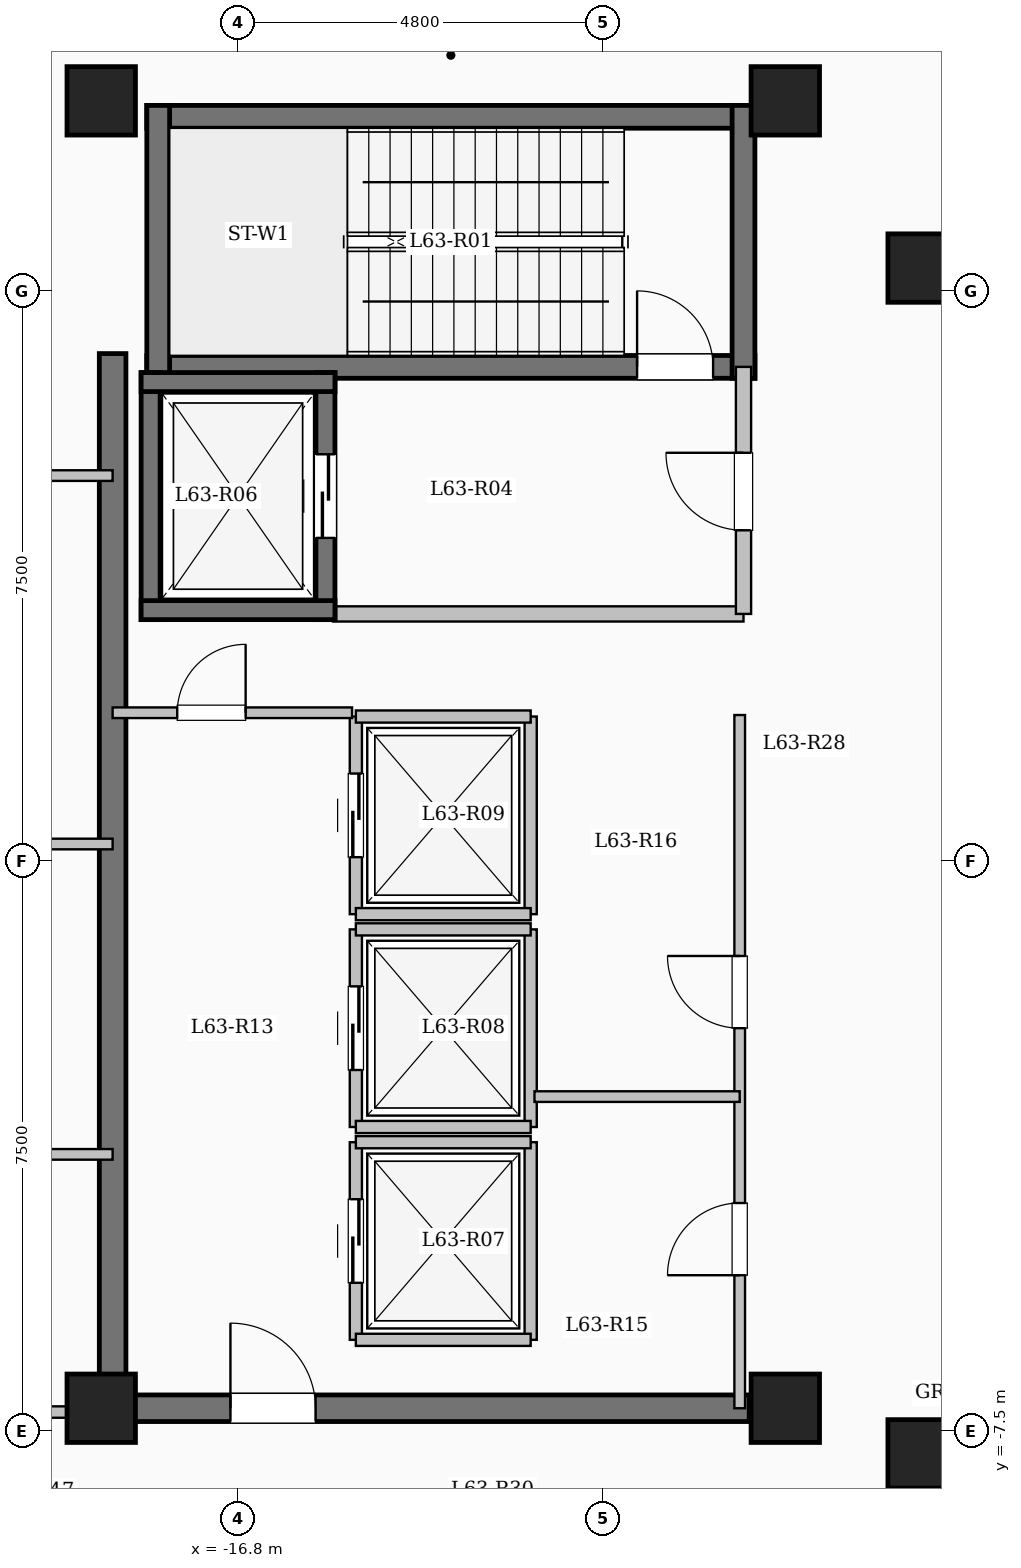
"""IFC4 building model, lengths in metres.
Left out: names, types, materials, properties, quantities, classifications, styles, units other than length and angle.
Written with IfcOpenShell. Run it as: python <this file> out.ifc"""

import sys

from ifc_helpers import new_model, si_unit, direction, frame, frame_2d, origin, origin_2d, place, context, subcontext, project, spatial, rectangle, extrude, element, fill, save


model = new_model("IFC4")
c1 = context("Model", 3, precision=1e-05, world=origin(), true_north=direction((0.0, 1.0)))
c2 = subcontext(c1, "Body", "Model", "MODEL_VIEW")
j1 = project(units=[si_unit("LENGTHUNIT", "METRE"), si_unit("PLANEANGLEUNIT", "RADIAN")], contexts=[c1])
p1 = place(None, origin())
s1 = spatial("IfcSite", under=j1, at=p1, CompositionType="ELEMENT")
p2 = place(p1, origin())
s2 = spatial("IfcBuilding", under=s1, at=p2, CompositionType="ELEMENT")
p3 = place(p2, frame((0.0, 0.0, 231.75)))
s3 = spatial("IfcBuildingStorey", under=s2, at=p3, CompositionType="ELEMENT", Elevation=231.75)
for number, where, z_axis, x_axis in (
    (1, (-7.8, -7.8, 0.0), (0.0, 0.0, 1.0), (1.0, 0.0, 0.0)),
    (2, (-7.8, 7.8, 0.0), (0.0, 0.0, 1.0), (1.0, 0.0, 0.0)),
    (3, (-9.6, -7.2, 0.0), (0.0, 0.0, 1.0), (1.0, 0.0, 0.0)),
    (4, (-9.6, 10.0, 0.0), (0.0, 0.0, 1.0), (1.0, 0.0, 0.0)),
    (5, (-18.6, -7.2, 0.0), (0.0, 0.0, 1.0), (1.0, 0.0, 0.0)),
    (6, (-18.6, 10.0, 0.0), (0.0, 0.0, 1.0), (1.0, 0.0, 0.0)),
):
    element("IfcColumn", number, at=place(p3, frame(where, z_axis=z_axis, x_axis=x_axis)), inside=s3, PredefinedType="COLUMN", context=c2, shape_type="SweptSolid", body=[
        extrude(rectangle(XDim=0.9, YDim=0.9, at=origin_2d()), origin(), (0.0, 0.0, 1.0), 4.65),
    ])
p4 = place(p3, frame((-18.0, 9.79, 0.0), z_axis=(0.0, 0.0, 1.0), x_axis=(1.0, 0.0, 0.0)))
e7 = element("IfcWall", 7, at=p4, inside=s3, PredefinedType="SHEAR", context=c2, shape_type="SweptSolid", body=[
    extrude(rectangle(XDim=8.0, YDim=0.3, at=frame_2d((4.0, 0.0))), origin(), (0.0, 0.0, 1.0), 4.65),
])
p5 = place(p3, frame((-18.0, 6.5, 0.0), z_axis=(0.0, 0.0, 1.0), x_axis=(1.0, 0.0, 0.0)))
e8 = element("IfcWall", 8, at=p5, inside=s3, PredefinedType="SHEAR", context=c2, shape_type="SweptSolid", body=[
    extrude(rectangle(XDim=8.0, YDim=0.3, at=frame_2d((4.0, 0.0))), origin(), (0.0, 0.0, 1.0), 4.65),
])
p6 = place(p5, frame((6.45, 0.0, 0.0)))
e9 = element("IfcOpeningElement", 9, at=p6, cuts=e8, PredefinedType="OPENING", context=c2, shape_type="SweptSolid", body=[
    extrude(rectangle(XDim=1.0, YDim=2.15, at=frame_2d((0.5, 1.075))), frame((0.0, 0.16, 0.0), z_axis=(0.0, -1.0, 0.0), x_axis=(1.0, 0.0, 0.0)), (0.0, 0.0, 1.0), 0.32),
])
for number, where, z_axis, x_axis in (
    (10, (-17.85, 6.35, 0.0), (0.0, 0.0, 1.0), (0.0, 1.0, 0.0)),
    (11, (-10.15, 6.35, 0.0), (0.0, 0.0, 1.0), (0.0, 1.0, 0.0)),
):
    element("IfcWall", number, at=place(p3, frame(where, z_axis=z_axis, x_axis=x_axis)), inside=s3, PredefinedType="SHEAR", context=c2, shape_type="SweptSolid", body=[
        extrude(rectangle(XDim=3.59, YDim=0.3, at=frame_2d((1.795, 0.0))), origin(), (0.0, 0.0, 1.0), 4.65),
    ])
p7 = place(p3, frame((-15.55, 3.25, 0.0), z_axis=(0.0, 0.0, 1.0), x_axis=(1.0, 0.0, 0.0)))
e12 = element("IfcWall", 12, at=p7, inside=s3, PredefinedType="SOLIDWALL", context=c2, shape_type="SweptSolid", body=[
    extrude(rectangle(XDim=5.4, YDim=0.2, at=frame_2d((2.7, 0.0))), origin(), (0.0, 0.0, 1.0), 4.35),
])
p8 = place(p3, frame((-10.15, 3.25, 0.0), z_axis=(0.0, 0.0, 1.0), x_axis=(0.0, 1.0, 0.0)))
e13 = element("IfcWall", 13, at=p8, inside=s3, PredefinedType="SOLIDWALL", context=c2, shape_type="SweptSolid", body=[
    extrude(rectangle(XDim=3.25, YDim=0.2, at=frame_2d((1.625, 0.0))), origin(), (0.0, 0.0, 1.0), 4.35),
])
p9 = place(p8, frame((1.1, 0.0, 0.0)))
e14 = element("IfcOpeningElement", 14, at=p9, cuts=e13, PredefinedType="OPENING", context=c2, shape_type="SweptSolid", body=[
    extrude(rectangle(XDim=1.02, YDim=2.15, at=frame_2d((0.51, 1.075))), frame((0.0, 0.11, 0.0), z_axis=(0.0, -1.0, 0.0), x_axis=(1.0, 0.0, 0.0)), (0.0, 0.0, 1.0), 0.22),
])
p10 = place(p3, frame((-17.95, 3.175, 0.0), z_axis=(0.0, 0.0, 1.0), x_axis=(0.0, 1.0, 0.0)))
e15 = element("IfcWall", 15, at=p10, inside=s3, PredefinedType="SHEAR", context=c2, shape_type="SweptSolid", body=[
    extrude(rectangle(XDim=3.25, YDim=0.25, at=frame_2d((1.625, 0.0))), origin(), (0.0, 0.0, 1.0), 4.65),
])
p11 = place(p3, frame((-15.65, 3.175, 0.0), z_axis=(0.0, 0.0, 1.0), x_axis=(0.0, 1.0, 0.0)))
e16 = element("IfcWall", 16, at=p11, inside=s3, PredefinedType="SHEAR", context=c2, shape_type="SweptSolid", body=[
    extrude(rectangle(XDim=3.25, YDim=0.25, at=frame_2d((1.625, 0.0))), origin(), (0.0, 0.0, 1.0), 4.65),
])
p12 = place(p11, frame((1.075, 0.0, 0.0)))
e17 = element("IfcOpeningElement", 17, at=p12, cuts=e16, PredefinedType="OPENING", context=c2, shape_type="SweptSolid", body=[
    extrude(rectangle(XDim=1.1, YDim=2.15, at=frame_2d((0.55, 1.075))), frame((0.0, 0.135, 0.0), z_axis=(0.0, -1.0, 0.0), x_axis=(1.0, 0.0, 0.0)), (0.0, 0.0, 1.0), 0.27),
])
for number, where, z_axis, x_axis in (
    (18, (-18.075, 3.3, 0.0), (0.0, 0.0, 1.0), (1.0, 0.0, 0.0)),
    (19, (-18.075, 6.3, 0.0), (0.0, 0.0, 1.0), (1.0, 0.0, 0.0)),
):
    element("IfcWall", number, at=place(p3, frame(where, z_axis=z_axis, x_axis=x_axis)), inside=s3, PredefinedType="SHEAR", context=c2, shape_type="SweptSolid", body=[
        extrude(rectangle(XDim=2.55, YDim=0.25, at=frame_2d((1.275, 0.0))), origin(), (0.0, 0.0, 1.0), 4.65),
    ])
p13 = place(p3, frame((-15.25, -6.3, 0.0), z_axis=(0.0, 0.0, 1.0), x_axis=(0.0, 1.0, 0.0)))
e20 = element("IfcWall", 20, at=p13, inside=s3, PredefinedType="SOLIDWALL", context=c2, shape_type="SweptSolid", body=[
    extrude(rectangle(XDim=2.6, YDim=0.16, at=frame_2d((1.3, 0.0))), origin(), (0.0, 0.0, 1.0), 4.35),
])
p14 = place(p13, frame((0.75, 0.0, 0.0)))
e21 = element("IfcOpeningElement", 21, at=p14, cuts=e20, PredefinedType="OPENING", context=c2, shape_type="SweptSolid", body=[
    extrude(rectangle(XDim=1.1, YDim=2.15, at=frame_2d((0.55, 1.075))), frame((0.0, 0.09, 0.0), z_axis=(0.0, -1.0, 0.0), x_axis=(1.0, 0.0, 0.0)), (0.0, 0.0, 1.0), 0.18),
])
p15 = place(p3, frame((-12.95, -6.3, 0.0), z_axis=(0.0, 0.0, 1.0), x_axis=(0.0, 1.0, 0.0)))
e22 = element("IfcWall", 22, at=p15, inside=s3, PredefinedType="SOLIDWALL", context=c2, shape_type="SweptSolid", body=[
    extrude(rectangle(XDim=2.6, YDim=0.16, at=frame_2d((1.3, 0.0))), origin(), (0.0, 0.0, 1.0), 4.35),
])
for number, where, z_axis, x_axis in (
    (23, (-15.25, -6.3, 0.0), (0.0, 0.0, 1.0), (1.0, 0.0, 0.0)),
    (24, (-15.25, -3.7, 0.0), (0.0, 0.0, 1.0), (1.0, 0.0, 0.0)),
):
    element("IfcWall", number, at=place(p3, frame(where, z_axis=z_axis, x_axis=x_axis)), inside=s3, PredefinedType="SOLIDWALL", context=c2, shape_type="SweptSolid", body=[
        extrude(rectangle(XDim=2.3, YDim=0.16, at=frame_2d((1.15, 0.0))), origin(), (0.0, 0.0, 1.0), 4.35),
    ])
p16 = place(p3, frame((-15.25, -3.5, 0.0), z_axis=(0.0, 0.0, 1.0), x_axis=(0.0, 1.0, 0.0)))
e25 = element("IfcWall", 25, at=p16, inside=s3, PredefinedType="SOLIDWALL", context=c2, shape_type="SweptSolid", body=[
    extrude(rectangle(XDim=2.6, YDim=0.16, at=frame_2d((1.3, 0.0))), origin(), (0.0, 0.0, 1.0), 4.35),
])
p17 = place(p16, frame((0.75, 0.0, 0.0)))
e26 = element("IfcOpeningElement", 26, at=p17, cuts=e25, PredefinedType="OPENING", context=c2, shape_type="SweptSolid", body=[
    extrude(rectangle(XDim=1.1, YDim=2.15, at=frame_2d((0.55, 1.075))), frame((0.0, 0.09, 0.0), z_axis=(0.0, -1.0, 0.0), x_axis=(1.0, 0.0, 0.0)), (0.0, 0.0, 1.0), 0.18),
])
p18 = place(p3, frame((-12.95, -3.5, 0.0), z_axis=(0.0, 0.0, 1.0), x_axis=(0.0, 1.0, 0.0)))
e27 = element("IfcWall", 27, at=p18, inside=s3, PredefinedType="SOLIDWALL", context=c2, shape_type="SweptSolid", body=[
    extrude(rectangle(XDim=2.6, YDim=0.16, at=frame_2d((1.3, 0.0))), origin(), (0.0, 0.0, 1.0), 4.35),
])
for number, where, z_axis, x_axis in (
    (28, (-15.25, -3.5, 0.0), (0.0, 0.0, 1.0), (1.0, 0.0, 0.0)),
    (29, (-15.25, -0.9, 0.0), (0.0, 0.0, 1.0), (1.0, 0.0, 0.0)),
):
    element("IfcWall", number, at=place(p3, frame(where, z_axis=z_axis, x_axis=x_axis)), inside=s3, PredefinedType="SOLIDWALL", context=c2, shape_type="SweptSolid", body=[
        extrude(rectangle(XDim=2.3, YDim=0.16, at=frame_2d((1.15, 0.0))), origin(), (0.0, 0.0, 1.0), 4.35),
    ])
p19 = place(p3, frame((-15.25, -0.7, 0.0), z_axis=(0.0, 0.0, 1.0), x_axis=(0.0, 1.0, 0.0)))
e30 = element("IfcWall", 30, at=p19, inside=s3, PredefinedType="SOLIDWALL", context=c2, shape_type="SweptSolid", body=[
    extrude(rectangle(XDim=2.6, YDim=0.16, at=frame_2d((1.3, 0.0))), origin(), (0.0, 0.0, 1.0), 4.35),
])
p20 = place(p19, frame((0.75, 0.0, 0.0)))
e31 = element("IfcOpeningElement", 31, at=p20, cuts=e30, PredefinedType="OPENING", context=c2, shape_type="SweptSolid", body=[
    extrude(rectangle(XDim=1.1, YDim=2.15, at=frame_2d((0.55, 1.075))), frame((0.0, 0.09, 0.0), z_axis=(0.0, -1.0, 0.0), x_axis=(1.0, 0.0, 0.0)), (0.0, 0.0, 1.0), 0.18),
])
p21 = place(p3, frame((-12.95, -0.7, 0.0), z_axis=(0.0, 0.0, 1.0), x_axis=(0.0, 1.0, 0.0)))
e32 = element("IfcWall", 32, at=p21, inside=s3, PredefinedType="SOLIDWALL", context=c2, shape_type="SweptSolid", body=[
    extrude(rectangle(XDim=2.6, YDim=0.16, at=frame_2d((1.3, 0.0))), origin(), (0.0, 0.0, 1.0), 4.35),
])
for number, where, z_axis, x_axis in (
    (33, (-15.25, -0.7, 0.0), (0.0, 0.0, 1.0), (1.0, 0.0, 0.0)),
    (34, (-15.25, 1.9, 0.0), (0.0, 0.0, 1.0), (1.0, 0.0, 0.0)),
):
    element("IfcWall", number, at=place(p3, frame(where, z_axis=z_axis, x_axis=x_axis)), inside=s3, PredefinedType="SOLIDWALL", context=c2, shape_type="SweptSolid", body=[
        extrude(rectangle(XDim=2.3, YDim=0.16, at=frame_2d((1.15, 0.0))), origin(), (0.0, 0.0, 1.0), 4.35),
    ])
p22 = place(p3, frame((-18.45, -7.375, 0.0), z_axis=(0.0, 0.0, 1.0), x_axis=(0.0, 1.0, 0.0)))
e35 = element("IfcWall", 35, at=p22, inside=s3, PredefinedType="SHEAR", context=c2, shape_type="SweptSolid", body=[
    extrude(rectangle(XDim=14.05, YDim=0.35, at=frame_2d((7.025, 0.0))), origin(), (0.0, 0.0, 1.0), 4.65),
])
p23 = place(p3, frame((-18.625, -7.2, 0.0), z_axis=(0.0, 0.0, 1.0), x_axis=(1.0, 0.0, 0.0)))
e36 = element("IfcWall", 36, at=p23, inside=s3, PredefinedType="SHEAR", context=c2, shape_type="SweptSolid", body=[
    extrude(rectangle(XDim=8.55, YDim=0.35, at=frame_2d((4.275, 0.0))), origin(), (0.0, 0.0, 1.0), 4.65),
])
p24 = place(p23, frame((1.725, 0.0, 0.0)))
e37 = element("IfcOpeningElement", 37, at=p24, cuts=e36, PredefinedType="OPENING", context=c2, shape_type="SweptSolid", body=[
    extrude(rectangle(XDim=1.12, YDim=2.15, at=frame_2d((0.56, 1.075))), frame((0.0, 0.185, 0.0), z_axis=(0.0, -1.0, 0.0), x_axis=(1.0, 0.0, 0.0)), (0.0, 0.0, 1.0), 0.37),
])
p25 = place(p3, frame((-18.45, 1.95, 0.0), z_axis=(0.0, 0.0, 1.0), x_axis=(1.0, 0.0, 0.0)))
e38 = element("IfcWall", 38, at=p25, inside=s3, PredefinedType="PARTITIONING", context=c2, shape_type="SweptSolid", body=[
    extrude(rectangle(XDim=3.15, YDim=0.14, at=frame_2d((1.575, 0.0))), origin(), (0.0, 0.0, 1.0), 4.35),
])
p26 = place(p25, frame((0.85, 0.0, 0.0)))
e39 = element("IfcOpeningElement", 39, at=p26, cuts=e38, PredefinedType="OPENING", context=c2, shape_type="SweptSolid", body=[
    extrude(rectangle(XDim=0.9, YDim=2.08, at=frame_2d((0.45, 1.04))), frame((0.0, 0.08, 0.0), z_axis=(0.0, -1.0, 0.0), x_axis=(1.0, 0.0, 0.0)), (0.0, 0.0, 1.0), 0.16),
])
p27 = place(p3, frame((-10.2, -7.2, 0.0), z_axis=(0.0, 0.0, 1.0), x_axis=(0.0, 1.0, 0.0)))
e40 = element("IfcWall", 40, at=p27, inside=s3, PredefinedType="PARTITIONING", context=c2, shape_type="SweptSolid", body=[
    extrude(rectangle(XDim=9.12, YDim=0.14, at=frame_2d((4.56, 0.0))), origin(), (0.0, 0.0, 1.0), 4.35),
])
p28 = place(p27, frame((1.75, 0.0, 0.0)))
e41 = element("IfcOpeningElement", 41, at=p28, cuts=e40, PredefinedType="OPENING", context=c2, shape_type="SweptSolid", body=[
    extrude(rectangle(XDim=0.95, YDim=2.12, at=frame_2d((0.475, 1.06))), frame((0.0, 0.08, 0.0), z_axis=(0.0, -1.0, 0.0), x_axis=(1.0, 0.0, 0.0)), (0.0, 0.0, 1.0), 0.16),
])
p29 = place(p27, frame((5.0, 0.0, 0.0)))
e42 = element("IfcOpeningElement", 42, at=p29, cuts=e40, PredefinedType="OPENING", context=c2, shape_type="SweptSolid", body=[
    extrude(rectangle(XDim=0.95, YDim=2.12, at=frame_2d((0.475, 1.06))), frame((0.0, 0.08, 0.0), z_axis=(0.0, -1.0, 0.0), x_axis=(1.0, 0.0, 0.0)), (0.0, 0.0, 1.0), 0.16),
])
p30 = place(p3, frame((-12.9, -3.1, 0.0), z_axis=(0.0, 0.0, 1.0), x_axis=(1.0, 0.0, 0.0)))
e43 = element("IfcWall", 43, at=p30, inside=s3, PredefinedType="PARTITIONING", context=c2, shape_type="SweptSolid", body=[
    extrude(rectangle(XDim=2.7, YDim=0.14, at=frame_2d((1.35, 0.0))), origin(), (0.0, 0.0, 1.0), 4.35),
])
p31 = place(p3, frame((-23.58, -7.25, 0.0), z_axis=(0.0, 0.0, 1.0), x_axis=(1.0, 0.0, 0.0)))
e44 = element("IfcWall", 44, at=p31, inside=s3, PredefinedType="PARTITIONING", context=c2, shape_type="SweptSolid", body=[
    extrude(rectangle(XDim=5.13, YDim=0.15, at=frame_2d((2.565, 0.0))), origin(), (0.0, 0.0, 1.0), 4.35),
])
p32 = place(p31, frame((2.08, 0.0, 0.0)))
e45 = element("IfcOpeningElement", 45, at=p32, cuts=e44, PredefinedType="OPENING", context=c2, shape_type="SweptSolid", body=[
    extrude(rectangle(XDim=1.08, YDim=2.15, at=frame_2d((0.54, 1.075))), frame((0.0, 0.085, 0.0), z_axis=(0.0, -1.0, 0.0), x_axis=(1.0, 0.0, 0.0)), (0.0, 0.0, 1.0), 0.17),
])
p33 = place(p3, frame((-23.58, -3.86, 0.0), z_axis=(0.0, 0.0, 1.0), x_axis=(1.0, 0.0, 0.0)))
e46 = element("IfcWall", 46, at=p33, inside=s3, PredefinedType="PARTITIONING", context=c2, shape_type="SweptSolid", body=[
    extrude(rectangle(XDim=5.13, YDim=0.14, at=frame_2d((2.565, 0.0))), origin(), (0.0, 0.0, 1.0), 4.35),
])
p34 = place(p33, frame((2.98, 0.0, 0.0)))
e47 = element("IfcOpeningElement", 47, at=p34, cuts=e46, PredefinedType="OPENING", context=c2, shape_type="SweptSolid", body=[
    extrude(rectangle(XDim=1.08, YDim=2.15, at=frame_2d((0.54, 1.075))), frame((0.0, 0.08, 0.0), z_axis=(0.0, -1.0, 0.0), x_axis=(1.0, 0.0, 0.0)), (0.0, 0.0, 1.0), 0.16),
])
p35 = place(p3, frame((-23.58, 0.223, 0.0), z_axis=(0.0, 0.0, 1.0), x_axis=(1.0, 0.0, 0.0)))
e48 = element("IfcWall", 48, at=p35, inside=s3, PredefinedType="PARTITIONING", context=c2, shape_type="SweptSolid", body=[
    extrude(rectangle(XDim=5.13, YDim=0.14, at=frame_2d((2.565, 0.0))), origin(), (0.0, 0.0, 1.0), 4.35),
])
p36 = place(p35, frame((2.98, 0.0, 0.0)))
e49 = element("IfcOpeningElement", 49, at=p36, cuts=e48, PredefinedType="OPENING", context=c2, shape_type="SweptSolid", body=[
    extrude(rectangle(XDim=1.08, YDim=2.15, at=frame_2d((0.54, 1.075))), frame((0.0, 0.08, 0.0), z_axis=(0.0, -1.0, 0.0), x_axis=(1.0, 0.0, 0.0)), (0.0, 0.0, 1.0), 0.16),
])
p37 = place(p3, frame((-23.58, 5.07, 0.0), z_axis=(0.0, 0.0, 1.0), x_axis=(1.0, 0.0, 0.0)))
e50 = element("IfcWall", 50, at=p37, inside=s3, PredefinedType="PARTITIONING", context=c2, shape_type="SweptSolid", body=[
    extrude(rectangle(XDim=5.13, YDim=0.14, at=frame_2d((2.565, 0.0))), origin(), (0.0, 0.0, 1.0), 4.35),
])
p38 = place(p37, frame((2.98, 0.0, 0.0)))
e51 = element("IfcOpeningElement", 51, at=p38, cuts=e50, PredefinedType="OPENING", context=c2, shape_type="SweptSolid", body=[
    extrude(rectangle(XDim=1.08, YDim=2.15, at=frame_2d((0.54, 1.075))), frame((0.0, 0.08, 0.0), z_axis=(0.0, -1.0, 0.0), x_axis=(1.0, 0.0, 0.0)), (0.0, 0.0, 1.0), 0.16),
])
p39 = place(p6, origin())
e52 = element("IfcDoor", 52, at=p39, inside=s3, OperationType="SINGLE_SWING_LEFT", PredefinedType="DOOR", context=c2, shape_type="SweptSolid", body=[
    extrude(rectangle(XDim=1.0, YDim=2.15, at=frame_2d((0.5, 1.075))), frame((0.0, 0.025, 0.0), z_axis=(0.0, -1.0, 0.0), x_axis=(1.0, 0.0, 0.0)), (0.0, 0.0, 1.0), 0.05),
])
fill(e9, e52)
p40 = place(p9, origin())
e53 = element("IfcDoor", 53, at=p40, inside=s3, OperationType="SINGLE_SWING_RIGHT", PredefinedType="DOOR", context=c2, shape_type="SweptSolid", body=[
    extrude(rectangle(XDim=1.02, YDim=2.15, at=frame_2d((0.51, 1.075))), frame((0.0, 0.025, 0.0), z_axis=(0.0, -1.0, 0.0), x_axis=(1.0, 0.0, 0.0)), (0.0, 0.0, 1.0), 0.05),
])
fill(e14, e53)
p41 = place(p12, origin())
e54 = element("IfcDoor", 54, at=p41, inside=s3, OperationType="SLIDING_TO_LEFT", PredefinedType="DOOR", context=c2, shape_type="SweptSolid", body=[
    extrude(rectangle(XDim=1.1, YDim=2.15, at=frame_2d((0.55, 1.075))), frame((0.0, 0.025, 0.0), z_axis=(0.0, -1.0, 0.0), x_axis=(1.0, 0.0, 0.0)), (0.0, 0.0, 1.0), 0.05),
])
fill(e17, e54)
p42 = place(p14, origin())
e55 = element("IfcDoor", 55, at=p42, inside=s3, OperationType="SLIDING_TO_LEFT", PredefinedType="DOOR", context=c2, shape_type="SweptSolid", body=[
    extrude(rectangle(XDim=1.1, YDim=2.15, at=frame_2d((0.55, 1.075))), frame((0.0, 0.025, 0.0), z_axis=(0.0, -1.0, 0.0), x_axis=(1.0, 0.0, 0.0)), (0.0, 0.0, 1.0), 0.05),
])
fill(e21, e55)
p43 = place(p17, origin())
e56 = element("IfcDoor", 56, at=p43, inside=s3, OperationType="SLIDING_TO_LEFT", PredefinedType="DOOR", context=c2, shape_type="SweptSolid", body=[
    extrude(rectangle(XDim=1.1, YDim=2.15, at=frame_2d((0.55, 1.075))), frame((0.0, 0.025, 0.0), z_axis=(0.0, -1.0, 0.0), x_axis=(1.0, 0.0, 0.0)), (0.0, 0.0, 1.0), 0.05),
])
fill(e26, e56)
p44 = place(p20, origin())
e57 = element("IfcDoor", 57, at=p44, inside=s3, OperationType="SLIDING_TO_LEFT", PredefinedType="DOOR", context=c2, shape_type="SweptSolid", body=[
    extrude(rectangle(XDim=1.1, YDim=2.15, at=frame_2d((0.55, 1.075))), frame((0.0, 0.025, 0.0), z_axis=(0.0, -1.0, 0.0), x_axis=(1.0, 0.0, 0.0)), (0.0, 0.0, 1.0), 0.05),
])
fill(e31, e57)
p45 = place(p24, origin())
e58 = element("IfcDoor", 58, at=p45, inside=s3, OperationType="SINGLE_SWING_LEFT", PredefinedType="DOOR", context=c2, shape_type="SweptSolid", body=[
    extrude(rectangle(XDim=1.12, YDim=2.15, at=frame_2d((0.56, 1.075))), frame((0.0, 0.025, 0.0), z_axis=(0.0, -1.0, 0.0), x_axis=(1.0, 0.0, 0.0)), (0.0, 0.0, 1.0), 0.05),
])
fill(e37, e58)
p46 = place(p26, origin())
e59 = element("IfcDoor", 59, at=p46, inside=s3, OperationType="SINGLE_SWING_RIGHT", PredefinedType="DOOR", context=c2, shape_type="SweptSolid", body=[
    extrude(rectangle(XDim=0.9, YDim=2.08, at=frame_2d((0.45, 1.04))), frame((0.0, 0.025, 0.0), z_axis=(0.0, -1.0, 0.0), x_axis=(1.0, 0.0, 0.0)), (0.0, 0.0, 1.0), 0.05),
])
fill(e39, e59)
p47 = place(p28, origin())
e60 = element("IfcDoor", 60, at=p47, inside=s3, OperationType="SINGLE_SWING_LEFT", PredefinedType="DOOR", context=c2, shape_type="SweptSolid", body=[
    extrude(rectangle(XDim=0.95, YDim=2.12, at=frame_2d((0.475, 1.06))), frame((0.0, 0.025, 0.0), z_axis=(0.0, -1.0, 0.0), x_axis=(1.0, 0.0, 0.0)), (0.0, 0.0, 1.0), 0.05),
])
fill(e41, e60)
p48 = place(p29, origin())
e61 = element("IfcDoor", 61, at=p48, inside=s3, OperationType="SINGLE_SWING_RIGHT", PredefinedType="DOOR", context=c2, shape_type="SweptSolid", body=[
    extrude(rectangle(XDim=0.95, YDim=2.12, at=frame_2d((0.475, 1.06))), frame((0.0, 0.025, 0.0), z_axis=(0.0, -1.0, 0.0), x_axis=(1.0, 0.0, 0.0)), (0.0, 0.0, 1.0), 0.05),
])
fill(e42, e61)
save(model, sys.argv[1])
